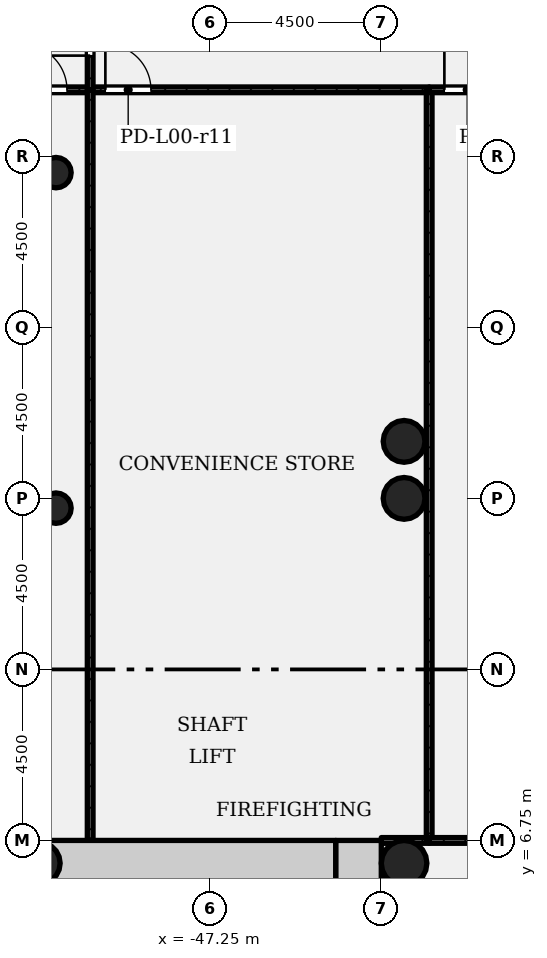
"""IFC4 building model, lengths in metres.
Left out: names, types, materials, properties, quantities, classifications, styles, units other than length and angle.
Written with IfcOpenShell. Run it as: python <this file> out.ifc"""

import sys

from ifc_helpers import new_model, si_unit, direction, frame, frame_2d, origin, origin_2d, place, context, subcontext, project, spatial, rectangle, hollow_circle, extrude, element, fill, save


model = new_model("IFC4")
c1 = context("Model", 3, precision=1e-05, world=origin(), true_north=direction((0.0, 1.0)))
c2 = subcontext(c1, "Body", "Model", "MODEL_VIEW")
j1 = project(units=[si_unit("LENGTHUNIT", "METRE"), si_unit("PLANEANGLEUNIT", "RADIAN")], contexts=[c1])
p1 = place(None, origin())
s1 = spatial("IfcSite", under=j1, at=p1, CompositionType="ELEMENT")
p2 = place(p1, origin())
s2 = spatial("IfcBuilding", under=s1, at=p2, CompositionType="ELEMENT")
p3 = place(p2, origin())
s3 = spatial("IfcBuildingStorey", under=s2, at=p3, CompositionType="ELEMENT", Elevation=0.0)
p4 = place(p3, frame((-43.35, -5.55, -0.4), z_axis=(0.0, 0.0, 1.0), x_axis=(0.0, 1.0, 0.0)))
e1 = element("IfcWall", 1, at=p4, inside=s3, PredefinedType="SHEAR", context=c2, shape_type="SweptSolid", body=[
    extrude(rectangle(XDim=12.3, YDim=1.2, at=frame_2d((6.15, 0.0))), origin(), (0.0, 0.0, 1.0), 6.4),
])
p5 = place(p4, frame((4.65, 0.0, 0.4)))
e2 = element("IfcOpeningElement", 2, at=p5, cuts=e1, PredefinedType="OPENING", context=c2, shape_type="SweptSolid", body=[
    extrude(rectangle(XDim=1.8, YDim=2.1, at=frame_2d((0.9, 1.05))), frame((0.0, 0.61, 0.0), z_axis=(0.0, -1.0, 0.0), x_axis=(1.0, 0.0, 0.0)), (0.0, 0.0, 1.0), 1.22),
])
p6 = place(p3, frame((-43.95, 6.15, -0.4), z_axis=(0.0, 0.0, 1.0), x_axis=(-1.0, 0.0, 0.0)))
e3 = element("IfcWall", 3, at=p6, inside=s3, PredefinedType="SHEAR", context=c2, shape_type="SweptSolid", body=[
    extrude(rectangle(XDim=7.8, YDim=1.2, at=frame_2d((3.9, 0.0))), origin(), (0.0, 0.0, 1.0), 6.4),
])
for number, where, z_axis, x_axis in (
    (4, (-42.15, 15.75, -0.4), (0.0, 0.0, 1.0), (1.0, 0.0, 0.0)),
    (5, (-42.15, 17.25, -0.4), (0.0, 0.0, 1.0), (1.0, 0.0, 0.0)),
    (6, (-51.75, 6.15, -0.4), (0.0, 0.0, 1.0), (1.0, 0.0, 0.0)),
):
    element("IfcColumn", number, at=place(p3, frame(where, z_axis=z_axis, x_axis=x_axis)), inside=s3, PredefinedType="COLUMN", context=c2, shape_type="SweptSolid", body=[
        extrude(hollow_circle(Radius=0.55, WallThickness=0.04, at=origin_2d()), origin(), (0.0, 0.0, 1.0), 6.4),
    ])
p7 = place(p3, frame((-42.15, 6.15, -0.4), z_axis=(0.0, 0.0, 1.0), x_axis=(1.0, 0.0, 0.0)))
e7 = element("IfcColumn", 7, at=p7, inside=s3, PredefinedType="COLUMN", context=c2, shape_type="SweptSolid", body=[
    extrude(hollow_circle(Radius=0.6, WallThickness=0.045, at=origin_2d()), origin(), (0.0, 0.0, 1.0), 6.4),
])
for number, where, z_axis, x_axis in (
    (8, (-51.31, 15.493, -0.4), (0.0, 0.0, 1.0), (1.0, 0.0, 0.0)),
    (9, (-51.31, 24.321, -0.4), (0.0, 0.0, 1.0), (1.0, 0.0, 0.0)),
):
    element("IfcColumn", number, at=place(p3, frame(where, z_axis=z_axis, x_axis=x_axis)), inside=s3, PredefinedType="COLUMN", context=c2, shape_type="SweptSolid", body=[
        extrude(hollow_circle(Radius=0.4, WallThickness=0.028, at=origin_2d()), origin(), (0.0, 0.0, 1.0), 6.4),
    ])
p8 = place(p3, frame((-52.37, 26.5, 0.0), z_axis=(0.0, 0.0, 1.0), x_axis=(1.0, 0.0, 0.0)))
e10 = element("IfcWall", 10, at=p8, inside=s3, PredefinedType="PARTITIONING", context=c2, shape_type="SweptSolid", body=[
    extrude(rectangle(XDim=1.96, YDim=0.15, at=frame_2d((0.98, 0.0))), origin(), (0.0, 0.0, 1.0), 5.58),
])
p9 = place(p8, frame((0.15, 0.0, 0.0)))
e11 = element("IfcOpeningElement", 11, at=p9, cuts=e10, PredefinedType="OPENING", context=c2, shape_type="SweptSolid", body=[
    extrude(rectangle(XDim=1.2, YDim=2.1, at=frame_2d((0.6, 1.05))), frame((0.0, 0.085, 0.0), z_axis=(0.0, -1.0, 0.0), x_axis=(1.0, 0.0, 0.0)), (0.0, 0.0, 1.0), 0.17),
])
p10 = place(p3, frame((-50.41, 26.5, 0.0), z_axis=(0.0, 0.0, 1.0), x_axis=(1.0, 0.0, 0.0)))
e12 = element("IfcWall", 12, at=p10, inside=s3, PredefinedType="PARTITIONING", context=c2, shape_type="SweptSolid", body=[
    extrude(rectangle(XDim=8.92, YDim=0.15, at=frame_2d((4.46, 0.0))), origin(), (0.0, 0.0, 1.0), 5.58),
])
p11 = place(p10, frame((0.4, 0.0, 0.0)))
e13 = element("IfcOpeningElement", 13, at=p11, cuts=e12, PredefinedType="OPENING", context=c2, shape_type="SweptSolid", body=[
    extrude(rectangle(XDim=1.2, YDim=2.1, at=frame_2d((0.6, 1.05))), frame((0.0, 0.085, 0.0), z_axis=(0.0, -1.0, 0.0), x_axis=(1.0, 0.0, 0.0)), (0.0, 0.0, 1.0), 0.17),
])
p12 = place(p3, frame((-41.49, 6.75, 0.0), z_axis=(0.0, 0.0, 1.0), x_axis=(-1.0, 0.0, 0.0)))
e14 = element("IfcWall", 14, at=p12, inside=s3, PredefinedType="PARTITIONING", context=c2, shape_type="SweptSolid", body=[
    extrude(rectangle(XDim=1.26, YDim=0.15, at=frame_2d((0.63, 0.0))), origin(), (0.0, 0.0, 1.0), 5.58),
])
for number, where, z_axis, x_axis in (
    (15, (-50.41, 6.75, 0.0), (0.0, 0.0, 1.0), (0.0, 1.0, 0.0)),
    (16, (-41.49, 26.5, 0.0), (0.0, 0.0, 1.0), (0.0, -1.0, 0.0)),
):
    element("IfcWall", number, at=place(p3, frame(where, z_axis=z_axis, x_axis=x_axis)), inside=s3, PredefinedType="PARTITIONING", context=c2, shape_type="SweptSolid", body=[
        extrude(rectangle(XDim=19.75, YDim=0.15, at=frame_2d((9.875, 0.0))), origin(), (0.0, 0.0, 1.0), 5.58),
    ])
p13 = place(p3, frame((-41.49, 26.5, 0.0), z_axis=(0.0, 0.0, 1.0), x_axis=(1.0, 0.0, 0.0)))
e17 = element("IfcWall", 17, at=p13, inside=s3, PredefinedType="PARTITIONING", context=c2, shape_type="SweptSolid", body=[
    extrude(rectangle(XDim=8.92, YDim=0.15, at=frame_2d((4.46, 0.0))), origin(), (0.0, 0.0, 1.0), 5.58),
])
p14 = place(p13, frame((0.4, 0.0, 0.0)))
e18 = element("IfcOpeningElement", 18, at=p14, cuts=e17, PredefinedType="OPENING", context=c2, shape_type="SweptSolid", body=[
    extrude(rectangle(XDim=1.2, YDim=2.1, at=frame_2d((0.6, 1.05))), frame((0.0, 0.085, 0.0), z_axis=(0.0, -1.0, 0.0), x_axis=(1.0, 0.0, 0.0)), (0.0, 0.0, 1.0), 0.17),
])
p15 = place(p3, frame((-32.57, 6.75, 0.0), z_axis=(0.0, 0.0, 1.0), x_axis=(-1.0, 0.0, 0.0)))
e19 = element("IfcWall", 19, at=p15, inside=s3, PredefinedType="PARTITIONING", context=c2, shape_type="SweptSolid", body=[
    extrude(rectangle(XDim=8.92, YDim=0.15, at=frame_2d((4.46, 0.0))), origin(), (0.0, 0.0, 1.0), 5.58),
])
p16 = place(p3, frame((-50.41, 26.5, 0.0), z_axis=(0.0, 0.0, 1.0), x_axis=(0.0, 1.0, 0.0)))
e20 = element("IfcWall", 20, at=p16, inside=s3, PredefinedType="PARTITIONING", context=c2, shape_type="SweptSolid", body=[
    extrude(rectangle(XDim=3.0, YDim=0.15, at=frame_2d((1.5, 0.0))), origin(), (0.0, 0.0, 1.0), 5.58),
])
p17 = place(p16, frame((0.9, 0.0, 0.0)))
e21 = element("IfcOpeningElement", 21, at=p17, cuts=e20, PredefinedType="OPENING", context=c2, shape_type="SweptSolid", body=[
    extrude(rectangle(XDim=1.2, YDim=2.1, at=frame_2d((0.6, 1.05))), frame((0.0, 0.085, 0.0), z_axis=(0.0, -1.0, 0.0), x_axis=(1.0, 0.0, 0.0)), (0.0, 0.0, 1.0), 0.17),
])
p18 = place(p9, origin())
e22 = element("IfcDoor", 22, at=p18, inside=s3, OperationType="SINGLE_SWING_RIGHT", PredefinedType="DOOR", context=c2, shape_type="SweptSolid", body=[
    extrude(rectangle(XDim=1.2, YDim=2.1, at=frame_2d((0.6, 1.05))), frame((0.0, 0.025, 0.0), z_axis=(0.0, -1.0, 0.0), x_axis=(1.0, 0.0, 0.0)), (0.0, 0.0, 1.0), 0.05),
])
fill(e11, e22)
p19 = place(p11, origin())
e23 = element("IfcDoor", 23, at=p19, inside=s3, OperationType="SINGLE_SWING_RIGHT", PredefinedType="DOOR", context=c2, shape_type="SweptSolid", body=[
    extrude(rectangle(XDim=1.2, YDim=2.1, at=frame_2d((0.6, 1.05))), frame((0.0, 0.025, 0.0), z_axis=(0.0, -1.0, 0.0), x_axis=(1.0, 0.0, 0.0)), (0.0, 0.0, 1.0), 0.05),
])
fill(e13, e23)
p20 = place(p14, origin())
e24 = element("IfcDoor", 24, at=p20, inside=s3, OperationType="SINGLE_SWING_RIGHT", PredefinedType="DOOR", context=c2, shape_type="SweptSolid", body=[
    extrude(rectangle(XDim=1.2, YDim=2.1, at=frame_2d((0.6, 1.05))), frame((0.0, 0.025, 0.0), z_axis=(0.0, -1.0, 0.0), x_axis=(1.0, 0.0, 0.0)), (0.0, 0.0, 1.0), 0.05),
])
fill(e18, e24)
p21 = place(p17, origin())
e25 = element("IfcDoor", 25, at=p21, inside=s3, OperationType="SINGLE_SWING_RIGHT", PredefinedType="DOOR", context=c2, shape_type="SweptSolid", body=[
    extrude(rectangle(XDim=1.2, YDim=2.1, at=frame_2d((0.6, 1.05))), frame((0.0, 0.025, 0.0), z_axis=(0.0, -1.0, 0.0), x_axis=(1.0, 0.0, 0.0)), (0.0, 0.0, 1.0), 0.05),
])
fill(e21, e25)
save(model, sys.argv[1])
